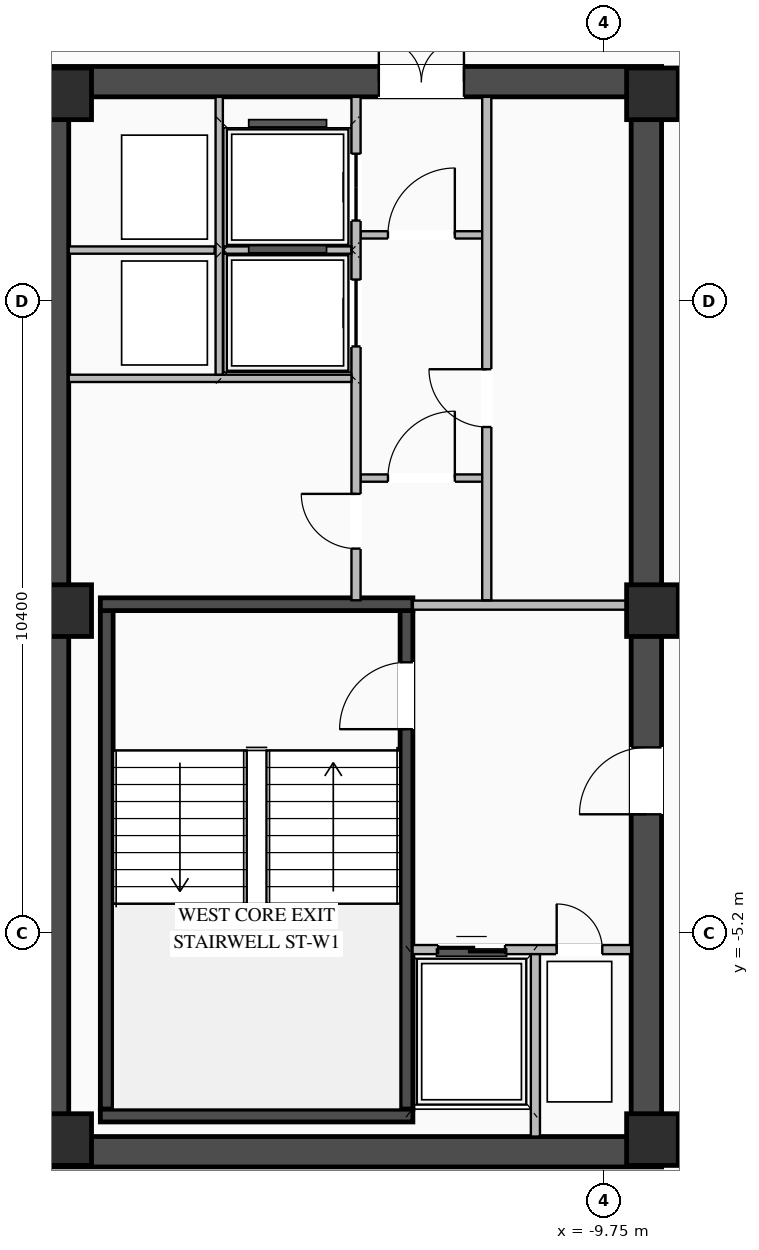
"""IFC4 building model, lengths in metres.
Left out: names, types, materials, properties, quantities, classifications, styles, units other than length and angle.
Written with IfcOpenShell. Run it as: python <this file> out.ifc"""

import sys

from ifc_helpers import new_model, si_unit, direction, frame, frame_2d, origin, origin_2d, place, context, subcontext, project, spatial, rectangle, extrude, element, fill, save


model = new_model("IFC4")
c1 = context("Model", 3, precision=1e-05, world=origin(), true_north=direction((0.0, 1.0)))
c2 = subcontext(c1, "Body", "Model", "MODEL_VIEW")
j1 = project(units=[si_unit("LENGTHUNIT", "METRE"), si_unit("PLANEANGLEUNIT", "RADIAN")], contexts=[c1])
p1 = place(None, origin())
s1 = spatial("IfcSite", under=j1, at=p1, CompositionType="ELEMENT")
p2 = place(p1, origin())
s2 = spatial("IfcBuilding", under=s1, at=p2, CompositionType="ELEMENT")
p3 = place(p2, frame((0.0, 0.0, 272.4)))
s3 = spatial("IfcBuildingStorey", under=s2, at=p3, CompositionType="ELEMENT", Elevation=272.4)
p4 = place(p3, frame((-19.05, -8.8, 0.0), z_axis=(0.0, 0.0, 1.0), x_axis=(1.0, 0.0, 0.0)))
e1 = element("IfcWall", 1, at=p4, inside=s3, PredefinedType="SHEAR", context=c2, shape_type="SweptSolid", body=[
    extrude(rectangle(XDim=10.25, YDim=0.5, at=frame_2d((5.125, 0.0))), origin(), (0.0, 0.0, 1.0), 3.27),
])
p5 = place(p3, frame((-19.05, 8.8, 0.0), z_axis=(0.0, 0.0, 1.0), x_axis=(1.0, 0.0, 0.0)))
e2 = element("IfcWall", 2, at=p5, inside=s3, PredefinedType="SHEAR", context=c2, shape_type="SweptSolid", body=[
    extrude(rectangle(XDim=10.25, YDim=0.5, at=frame_2d((5.125, 0.0))), origin(), (0.0, 0.0, 1.0), 3.27),
])
p6 = place(p5, frame((5.6, 0.0, 0.0)))
e3 = element("IfcOpeningElement", 3, at=p6, cuts=e2, PredefinedType="OPENING", context=c2, shape_type="SweptSolid", body=[
    extrude(rectangle(XDim=1.4, YDim=2.05, at=frame_2d((0.7, 1.025))), frame((0.0, 0.26, 0.0), z_axis=(0.0, -1.0, 0.0), x_axis=(1.0, 0.0, 0.0)), (0.0, 0.0, 1.0), 0.52),
])
p7 = place(p3, frame((-18.8, -8.55, 0.0), z_axis=(0.0, 0.0, 1.0), x_axis=(0.0, 1.0, 0.0)))
e4 = element("IfcWall", 4, at=p7, inside=s3, PredefinedType="SHEAR", context=c2, shape_type="SweptSolid", body=[
    extrude(rectangle(XDim=17.1, YDim=0.5, at=frame_2d((8.55, 0.0))), origin(), (0.0, 0.0, 1.0), 3.27),
])
p8 = place(p3, frame((-9.05, -8.55, 0.0), z_axis=(0.0, 0.0, 1.0), x_axis=(0.0, 1.0, 0.0)))
e5 = element("IfcWall", 5, at=p8, inside=s3, PredefinedType="SHEAR", context=c2, shape_type="SweptSolid", body=[
    extrude(rectangle(XDim=17.1, YDim=0.5, at=frame_2d((8.55, 0.0))), origin(), (0.0, 0.0, 1.0), 3.27),
])
p9 = place(p8, frame((5.3, 0.0, 0.0)))
e6 = element("IfcOpeningElement", 6, at=p9, cuts=e5, PredefinedType="OPENING", context=c2, shape_type="SweptSolid", body=[
    extrude(rectangle(XDim=1.1, YDim=2.08, at=frame_2d((0.55, 1.04))), frame((0.0, 0.26, 0.0), z_axis=(0.0, -1.0, 0.0), x_axis=(1.0, 0.0, 0.0)), (0.0, 0.0, 1.0), 0.52),
])
p10 = place(p3, frame((-12.995, -8.1, 0.0), z_axis=(0.0, 0.0, 1.0), x_axis=(0.0, 1.0, 0.0)))
e7 = element("IfcWall", 7, at=p10, inside=s3, PredefinedType="SHEAR", context=c2, shape_type="SweptSolid", body=[
    extrude(rectangle(XDim=8.2, YDim=0.21, at=frame_2d((4.1, 0.0))), origin(), (0.0, 0.0, 1.0), 3.27),
])
p11 = place(p10, frame((6.25, 0.0, 0.0)))
e8 = element("IfcOpeningElement", 8, at=p11, cuts=e7, PredefinedType="OPENING", context=c2, shape_type="SweptSolid", body=[
    extrude(rectangle(XDim=1.1, YDim=2.15, at=frame_2d((0.55, 1.075))), frame((0.0, 0.115, 0.0), z_axis=(0.0, -1.0, 0.0), x_axis=(1.0, 0.0, 0.0)), (0.0, 0.0, 1.0), 0.23),
])
p12 = place(p3, frame((-17.925, -8.1, 0.0), z_axis=(0.0, 0.0, 1.0), x_axis=(0.0, 1.0, 0.0)))
e9 = element("IfcWall", 9, at=p12, inside=s3, PredefinedType="SHEAR", context=c2, shape_type="SweptSolid", body=[
    extrude(rectangle(XDim=8.2, YDim=0.21, at=frame_2d((4.1, 0.0))), origin(), (0.0, 0.0, 1.0), 3.27),
])
for number, where, z_axis, x_axis in (
    (10, (-18.03, -8.205, 0.0), (0.0, 0.0, 1.0), (1.0, 0.0, 0.0)),
    (11, (-12.89, 0.205, 0.0), (0.0, 0.0, 1.0), (-1.0, 0.0, 0.0)),
):
    element("IfcWall", number, at=place(p3, frame(where, z_axis=z_axis, x_axis=x_axis)), inside=s3, PredefinedType="SHEAR", context=c2, shape_type="SweptSolid", body=[
        extrude(rectangle(XDim=5.14, YDim=0.21, at=frame_2d((2.57, 0.0))), origin(), (0.0, 0.0, 1.0), 3.27),
    ])
for number, where, z_axis, x_axis in (
    (12, (-8.95, -8.6, 0.0), (0.0, 0.0, 1.0), (1.0, 0.0, 0.0)),
    (13, (-8.95, 0.1, 0.0), (0.0, 0.0, 1.0), (1.0, 0.0, 0.0)),
    (14, (-8.95, 8.6, 0.0), (0.0, 0.0, 1.0), (1.0, 0.0, 0.0)),
    (15, (-18.6, -8.6, 0.0), (0.0, 0.0, 1.0), (1.0, 0.0, 0.0)),
    (16, (-18.6, 0.1, 0.0), (0.0, 0.0, 1.0), (1.0, 0.0, 0.0)),
    (17, (-18.6, 8.6, 0.0), (0.0, 0.0, 1.0), (1.0, 0.0, 0.0)),
):
    element("IfcColumn", number, at=place(p3, frame(where, z_axis=z_axis, x_axis=x_axis)), inside=s3, PredefinedType="COLUMN", context=c2, shape_type="SweptSolid", body=[
        extrude(rectangle(XDim=0.85, YDim=0.85, at=origin_2d()), origin(), (0.0, 0.0, 1.0), 3.45),
    ])
p13 = place(p3, frame((-12.895, -5.475, 0.0), z_axis=(0.0, 0.0, 1.0), x_axis=(1.0, 0.0, 0.0)))
e18 = element("IfcWall", 18, at=p13, inside=s3, PredefinedType="STANDARD", context=c2, shape_type="SweptSolid", body=[
    extrude(rectangle(XDim=3.595, YDim=0.15, at=frame_2d((1.797, 0.0))), origin(), (0.0, 0.0, 1.0), 3.25),
])
p14 = place(p13, frame((0.42, 0.0, 0.0)))
e19 = element("IfcOpeningElement", 19, at=p14, cuts=e18, PredefinedType="OPENING", context=c2, shape_type="SweptSolid", body=[
    extrude(rectangle(XDim=1.1, YDim=2.15, at=frame_2d((0.55, 1.075))), frame((0.0, 0.085, 0.0), z_axis=(0.0, -1.0, 0.0), x_axis=(1.0, 0.0, 0.0)), (0.0, 0.0, 1.0), 0.17),
])
p15 = place(p13, frame((2.37, 0.0, 0.0)))
e20 = element("IfcOpeningElement", 20, at=p15, cuts=e18, PredefinedType="OPENING", context=c2, shape_type="SweptSolid", body=[
    extrude(rectangle(XDim=0.75, YDim=2.05, at=frame_2d((0.375, 1.025))), frame((0.0, 0.085, 0.0), z_axis=(0.0, -1.0, 0.0), x_axis=(1.0, 0.0, 0.0)), (0.0, 0.0, 1.0), 0.17),
])
p16 = place(p3, frame((-10.875, -8.55, 0.0), z_axis=(0.0, 0.0, 1.0), x_axis=(0.0, 1.0, 0.0)))
e21 = element("IfcWall", 21, at=p16, inside=s3, PredefinedType="STANDARD", context=c2, shape_type="SweptSolid", body=[
    extrude(rectangle(XDim=3.0, YDim=0.15, at=frame_2d((1.5, 0.0))), origin(), (0.0, 0.0, 1.0), 3.25),
])
p17 = place(p3, frame((-12.89, 0.19, 0.0), z_axis=(0.0, 0.0, 1.0), x_axis=(1.0, 0.0, 0.0)))
e22 = element("IfcWall", 22, at=p17, inside=s3, PredefinedType="STANDARD", context=c2, shape_type="SweptSolid", body=[
    extrude(rectangle(XDim=3.59, YDim=0.15, at=frame_2d((1.795, 0.0))), origin(), (0.0, 0.0, 1.0), 2.645),
])
p18 = place(p3, frame((-13.75, 2.28, 0.0), z_axis=(0.0, 0.0, 1.0), x_axis=(1.0, 0.0, 0.0)))
e23 = element("IfcWall", 23, at=p18, inside=s3, PredefinedType="STANDARD", context=c2, shape_type="SweptSolid", body=[
    extrude(rectangle(XDim=2.0, YDim=0.12, at=frame_2d((1.0, 0.0))), origin(), (0.0, 0.0, 1.0), 3.25),
])
p19 = place(p18, frame((0.45, 0.0, 0.0)))
e24 = element("IfcOpeningElement", 24, at=p19, cuts=e23, PredefinedType="OPENING", context=c2, shape_type="SweptSolid", body=[
    extrude(rectangle(XDim=1.1, YDim=2.1, at=frame_2d((0.55, 1.05))), frame((0.0, 0.07, 0.0), z_axis=(0.0, -1.0, 0.0), x_axis=(1.0, 0.0, 0.0)), (0.0, 0.0, 1.0), 0.14),
])
p20 = place(p3, frame((-13.75, 6.28, 0.0), z_axis=(0.0, 0.0, 1.0), x_axis=(1.0, 0.0, 0.0)))
e25 = element("IfcWall", 25, at=p20, inside=s3, PredefinedType="STANDARD", context=c2, shape_type="SweptSolid", body=[
    extrude(rectangle(XDim=2.0, YDim=0.12, at=frame_2d((1.0, 0.0))), origin(), (0.0, 0.0, 1.0), 3.25),
])
p21 = place(p20, frame((0.45, 0.0, 0.0)))
e26 = element("IfcOpeningElement", 26, at=p21, cuts=e25, PredefinedType="OPENING", context=c2, shape_type="SweptSolid", body=[
    extrude(rectangle(XDim=1.1, YDim=2.1, at=frame_2d((0.55, 1.05))), frame((0.0, 0.07, 0.0), z_axis=(0.0, -1.0, 0.0), x_axis=(1.0, 0.0, 0.0)), (0.0, 0.0, 1.0), 0.14),
])
p22 = place(p3, frame((-11.675, 0.27, 0.0), z_axis=(0.0, 0.0, 1.0), x_axis=(0.0, 1.0, 0.0)))
e27 = element("IfcWall", 27, at=p22, inside=s3, PredefinedType="STANDARD", context=c2, shape_type="SweptSolid", body=[
    extrude(rectangle(XDim=8.28, YDim=0.15, at=frame_2d((4.14, 0.0))), origin(), (0.0, 0.0, 1.0), 3.25),
])
p23 = place(p22, frame((2.85, 0.0, 0.0)))
e28 = element("IfcOpeningElement", 28, at=p23, cuts=e27, PredefinedType="OPENING", context=c2, shape_type="SweptSolid", body=[
    extrude(rectangle(XDim=0.95, YDim=2.05, at=frame_2d((0.475, 1.025))), frame((0.0, 0.085, 0.0), z_axis=(0.0, -1.0, 0.0), x_axis=(1.0, 0.0, 0.0)), (0.0, 0.0, 1.0), 0.17),
])
p24 = place(p3, frame((-13.825, 0.27, 0.0), z_axis=(0.0, 0.0, 1.0), x_axis=(0.0, 1.0, 0.0)))
e29 = element("IfcWall", 29, at=p24, inside=s3, PredefinedType="STANDARD", context=c2, shape_type="SweptSolid", body=[
    extrude(rectangle(XDim=8.28, YDim=0.15, at=frame_2d((4.14, 0.0))), origin(), (0.0, 0.0, 1.0), 3.25),
])
p25 = place(p24, frame((4.175, 0.0, 0.0)))
e30 = element("IfcOpeningElement", 30, at=p25, cuts=e29, PredefinedType="OPENING", context=c2, shape_type="SweptSolid", body=[
    extrude(rectangle(XDim=1.1, YDim=2.1, at=frame_2d((0.55, 1.05))), frame((0.0, 0.085, 0.0), z_axis=(0.0, -1.0, 0.0), x_axis=(1.0, 0.0, 0.0)), (0.0, 0.0, 1.0), 0.17),
])
p26 = place(p24, frame((6.245, 0.0, 0.0)))
e31 = element("IfcOpeningElement", 31, at=p26, cuts=e29, PredefinedType="OPENING", context=c2, shape_type="SweptSolid", body=[
    extrude(rectangle(XDim=1.1, YDim=2.1, at=frame_2d((0.55, 1.05))), frame((0.0, 0.085, 0.0), z_axis=(0.0, -1.0, 0.0), x_axis=(1.0, 0.0, 0.0)), (0.0, 0.0, 1.0), 0.17),
])
p27 = place(p24, frame((0.85, 0.0, 0.0)))
e32 = element("IfcOpeningElement", 32, at=p27, cuts=e29, PredefinedType="OPENING", context=c2, shape_type="SweptSolid", body=[
    extrude(rectangle(XDim=0.9, YDim=2.05, at=frame_2d((0.45, 1.025))), frame((0.0, 0.085, 0.0), z_axis=(0.0, -1.0, 0.0), x_axis=(1.0, 0.0, 0.0)), (0.0, 0.0, 1.0), 0.17),
])
p28 = place(p3, frame((-18.55, 3.92, 0.0), z_axis=(0.0, 0.0, 1.0), x_axis=(1.0, 0.0, 0.0)))
e33 = element("IfcWall", 33, at=p28, inside=s3, PredefinedType="STANDARD", context=c2, shape_type="SweptSolid", body=[
    extrude(rectangle(XDim=4.65, YDim=0.12, at=frame_2d((2.325, 0.0))), origin(), (0.0, 0.0, 1.0), 3.25),
])
p29 = place(p3, frame((-18.55, 6.03, 0.0), z_axis=(0.0, 0.0, 1.0), x_axis=(1.0, 0.0, 0.0)))
e34 = element("IfcWall", 34, at=p29, inside=s3, PredefinedType="STANDARD", context=c2, shape_type="SweptSolid", body=[
    extrude(rectangle(XDim=2.4, YDim=0.12, at=frame_2d((1.2, 0.0))), origin(), (0.0, 0.0, 1.0), 3.25),
])
p30 = place(p3, frame((-16.075, 3.98, 0.0), z_axis=(0.0, 0.0, 1.0), x_axis=(0.0, 1.0, 0.0)))
e35 = element("IfcWall", 35, at=p30, inside=s3, PredefinedType="STANDARD", context=c2, shape_type="SweptSolid", body=[
    extrude(rectangle(XDim=4.57, YDim=0.12, at=frame_2d((2.285, 0.0))), origin(), (0.0, 0.0, 1.0), 3.25),
])
p31 = place(p3, frame((-16.0, 6.03, 0.0), z_axis=(0.0, 0.0, 1.0), x_axis=(1.0, 0.0, 0.0)))
e36 = element("IfcWall", 36, at=p31, inside=s3, PredefinedType="STANDARD", context=c2, shape_type="SweptSolid", body=[
    extrude(rectangle(XDim=2.1, YDim=0.12, at=frame_2d((1.05, 0.0))), origin(), (0.0, 0.0, 1.0), 3.25),
])
p32 = place(p11, origin())
e37 = element("IfcDoor", 37, at=p32, inside=s3, OperationType="SINGLE_SWING_LEFT", PredefinedType="DOOR", context=c2, shape_type="SweptSolid", body=[
    extrude(rectangle(XDim=1.1, YDim=2.15, at=frame_2d((0.55, 1.075))), frame((0.0, 0.025, 0.0), z_axis=(0.0, -1.0, 0.0), x_axis=(1.0, 0.0, 0.0)), (0.0, 0.0, 1.0), 0.05),
])
fill(e8, e37)
p33 = place(p14, origin())
e38 = element("IfcDoor", 38, at=p33, inside=s3, OperationType="DOUBLE_DOOR_SLIDING", PredefinedType="DOOR", context=c2, shape_type="SweptSolid", body=[
    extrude(rectangle(XDim=1.1, YDim=2.15, at=frame_2d((0.55, 1.075))), frame((0.0, 0.025, 0.0), z_axis=(0.0, -1.0, 0.0), x_axis=(1.0, 0.0, 0.0)), (0.0, 0.0, 1.0), 0.05),
])
fill(e19, e38)
p34 = place(p15, origin())
e39 = element("IfcDoor", 39, at=p34, inside=s3, OperationType="SINGLE_SWING_LEFT", PredefinedType="DOOR", context=c2, shape_type="SweptSolid", body=[
    extrude(rectangle(XDim=0.75, YDim=2.05, at=frame_2d((0.375, 1.025))), frame((0.0, 0.025, 0.0), z_axis=(0.0, -1.0, 0.0), x_axis=(1.0, 0.0, 0.0)), (0.0, 0.0, 1.0), 0.05),
])
fill(e20, e39)
p35 = place(p9, origin())
e40 = element("IfcDoor", 40, at=p35, inside=s3, OperationType="SINGLE_SWING_LEFT", PredefinedType="DOOR", context=c2, shape_type="SweptSolid", body=[
    extrude(rectangle(XDim=1.1, YDim=2.08, at=frame_2d((0.55, 1.04))), frame((0.0, 0.205, 0.0), z_axis=(0.0, -1.0, 0.0), x_axis=(1.0, 0.0, 0.0)), (0.0, 0.0, 1.0), 0.05),
])
fill(e6, e40)
p36 = place(p19, origin())
e41 = element("IfcDoor", 41, at=p36, inside=s3, OperationType="SINGLE_SWING_RIGHT", PredefinedType="DOOR", context=c2, shape_type="SweptSolid", body=[
    extrude(rectangle(XDim=1.1, YDim=2.1, at=frame_2d((0.55, 1.05))), frame((0.0, 0.025, 0.0), z_axis=(0.0, -1.0, 0.0), x_axis=(1.0, 0.0, 0.0)), (0.0, 0.0, 1.0), 0.05),
])
fill(e24, e41)
p37 = place(p21, origin())
e42 = element("IfcDoor", 42, at=p37, inside=s3, OperationType="SINGLE_SWING_RIGHT", PredefinedType="DOOR", context=c2, shape_type="SweptSolid", body=[
    extrude(rectangle(XDim=1.1, YDim=2.1, at=frame_2d((0.55, 1.05))), frame((0.0, 0.025, 0.0), z_axis=(0.0, -1.0, 0.0), x_axis=(1.0, 0.0, 0.0)), (0.0, 0.0, 1.0), 0.05),
])
fill(e26, e42)
p38 = place(p6, origin())
e43 = element("IfcDoor", 43, at=p38, inside=s3, OperationType="DOUBLE_DOOR_SINGLE_SWING", PredefinedType="DOOR", context=c2, shape_type="SweptSolid", body=[
    extrude(rectangle(XDim=1.4, YDim=2.05, at=frame_2d((0.7, 1.025))), frame((0.0, 0.195, 0.0), z_axis=(0.0, -1.0, 0.0), x_axis=(1.0, 0.0, 0.0)), (0.0, 0.0, 1.0), 0.05),
])
fill(e3, e43)
p39 = place(p23, origin())
e44 = element("IfcDoor", 44, at=p39, inside=s3, OperationType="SINGLE_SWING_RIGHT", PredefinedType="DOOR", context=c2, shape_type="SweptSolid", body=[
    extrude(rectangle(XDim=0.95, YDim=2.05, at=frame_2d((0.475, 1.025))), frame((0.0, 0.025, 0.0), z_axis=(0.0, -1.0, 0.0), x_axis=(1.0, 0.0, 0.0)), (0.0, 0.0, 1.0), 0.05),
])
fill(e28, e44)
p40 = place(p25, origin())
e45 = element("IfcDoor", 45, at=p40, inside=s3, OperationType="DOUBLE_DOOR_SLIDING", PredefinedType="DOOR", context=c2, shape_type="SweptSolid", body=[
    extrude(rectangle(XDim=1.1, YDim=2.1, at=frame_2d((0.55, 1.05))), frame((0.0, 0.025, 0.0), z_axis=(0.0, -1.0, 0.0), x_axis=(1.0, 0.0, 0.0)), (0.0, 0.0, 1.0), 0.05),
])
fill(e30, e45)
p41 = place(p26, origin())
e46 = element("IfcDoor", 46, at=p41, inside=s3, OperationType="DOUBLE_DOOR_SLIDING", PredefinedType="DOOR", context=c2, shape_type="SweptSolid", body=[
    extrude(rectangle(XDim=1.1, YDim=2.1, at=frame_2d((0.55, 1.05))), frame((0.0, 0.025, 0.0), z_axis=(0.0, -1.0, 0.0), x_axis=(1.0, 0.0, 0.0)), (0.0, 0.0, 1.0), 0.05),
])
fill(e31, e46)
p42 = place(p27, origin())
e47 = element("IfcDoor", 47, at=p42, inside=s3, OperationType="SINGLE_SWING_RIGHT", PredefinedType="DOOR", context=c2, shape_type="SweptSolid", body=[
    extrude(rectangle(XDim=0.9, YDim=2.05, at=frame_2d((0.45, 1.025))), frame((0.0, 0.025, 0.0), z_axis=(0.0, -1.0, 0.0), x_axis=(1.0, 0.0, 0.0)), (0.0, 0.0, 1.0), 0.05),
])
fill(e32, e47)
save(model, sys.argv[1])
